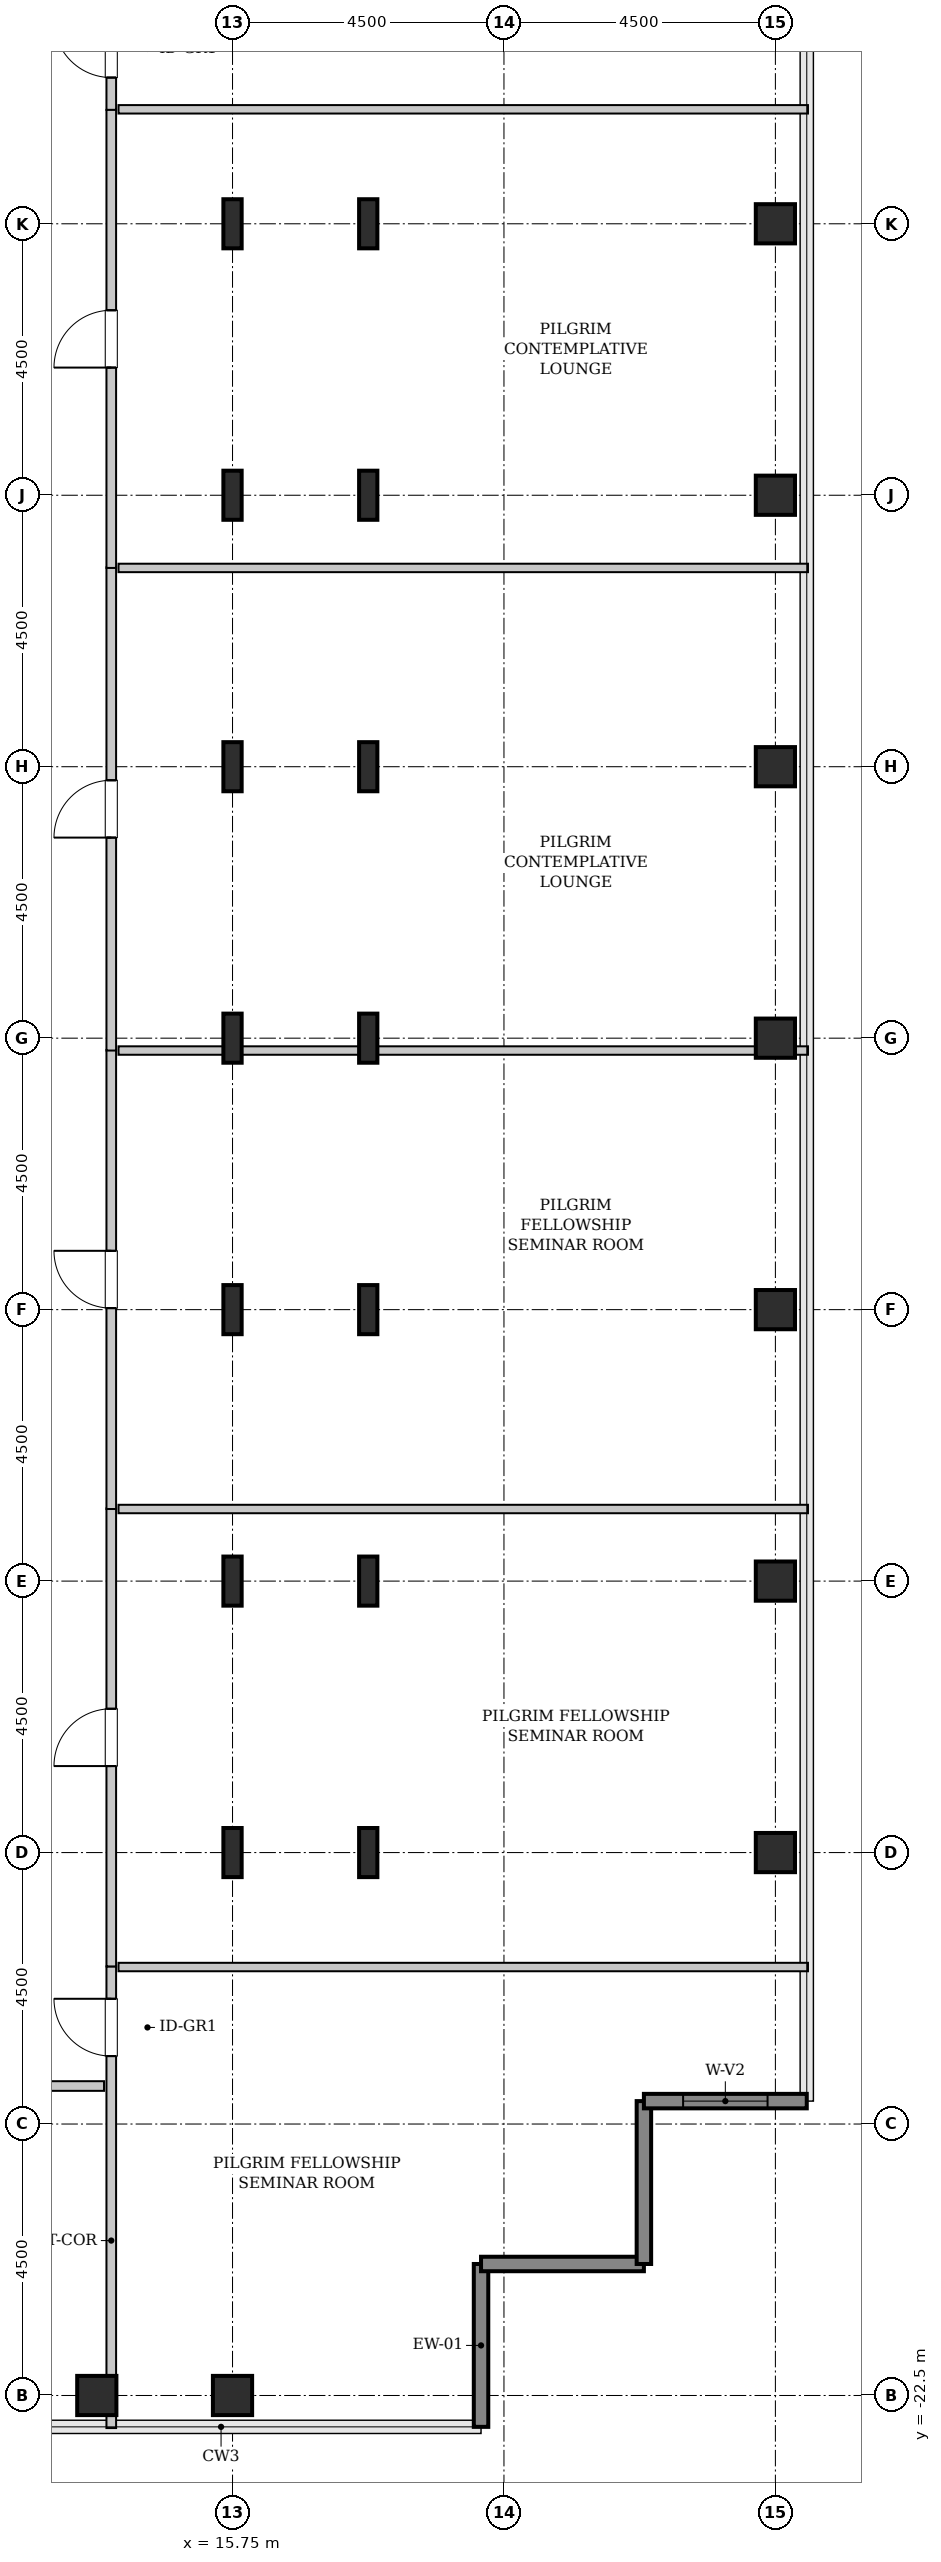
"""IFC4 building model, lengths in metres.
Left out: names, types, materials, properties, quantities, classifications, styles, units other than length and angle.
Written with IfcOpenShell. Run it as: python <this file> out.ifc"""

import sys

from ifc_helpers import new_model, si_unit, direction, frame, frame_2d, origin, origin_2d, place, context, subcontext, project, spatial, rectangle, hollow_rectangle, i_section, extrude, source, transform, mapped, element, fill, save


model = new_model("IFC4")
c1 = context("Model", 3, precision=1e-05, world=origin(), true_north=direction((0.0, 1.0)))
c2 = subcontext(c1, "Body", "Model", "MODEL_VIEW")
j1 = project(units=[si_unit("LENGTHUNIT", "METRE"), si_unit("PLANEANGLEUNIT", "RADIAN")], contexts=[c1])
p1 = place(None, origin())
s1 = spatial("IfcSite", under=j1, at=p1, CompositionType="ELEMENT")
p2 = place(p1, origin())
s2 = spatial("IfcBuilding", under=s1, at=p2, CompositionType="ELEMENT")
p3 = place(p2, frame((0.0, 0.0, 233.2)))
s3 = spatial("IfcBuildingStorey", under=s2, at=p3, CompositionType="ELEMENT", Elevation=233.2)
m1 = source(origin(), c2, "Body", "SweptSolid", [
    extrude(hollow_rectangle(XDim=0.65, YDim=0.65, WallThickness=0.032, InnerFilletRadius=0.032, OuterFilletRadius=0.064, at=origin_2d()), origin(), (0.0, 0.0, 1.0), 3.8),
])
for number, where, z_axis, x_axis in (
    (1, (13.5, -22.5, 0.0), (0.0, 0.0, 1.0), (1.0, 0.0, 0.0)),
    (2, (15.75, -22.5, 0.0), (0.0, 0.0, 1.0), (1.0, 0.0, 0.0)),
):
    element("IfcColumn", number, at=place(p3, frame(where, z_axis=z_axis, x_axis=x_axis)), inside=s3, PredefinedType="COLUMN", context=c2, shape_type="MappedRepresentation", body=[
        mapped(m1, transform((0.0, 0.0, 0.0), x_axis=(1.0, 0.0, 0.0), y_axis=(0.0, 1.0, 0.0), z_axis=(0.0, 0.0, 1.0), scale=1.0)),
    ])
m2 = source(origin(), c2, "Body", "SweptSolid", [
    extrude(i_section(OverallWidth=0.303, OverallDepth=0.814, WebThickness=0.021, FlangeThickness=0.04, FilletRadius=0.03, at=origin_2d()), origin(), (0.0, 0.0, 1.0), 3.8),
])
for number, where, z_axis, x_axis in (
    (3, (15.75, -13.5, 0.0), (0.0, 0.0, 1.0), (1.0, 0.0, 0.0)),
    (4, (15.75, -9.0, 0.0), (0.0, 0.0, 1.0), (1.0, 0.0, 0.0)),
    (5, (15.75, -4.5, 0.0), (0.0, 0.0, 1.0), (1.0, 0.0, 0.0)),
    (6, (15.75, 0.0, 0.0), (0.0, 0.0, 1.0), (1.0, 0.0, 0.0)),
    (7, (15.75, 4.5, 0.0), (0.0, 0.0, 1.0), (1.0, 0.0, 0.0)),
    (8, (15.75, 9.0, 0.0), (0.0, 0.0, 1.0), (1.0, 0.0, 0.0)),
    (9, (15.75, 13.5, 0.0), (0.0, 0.0, 1.0), (1.0, 0.0, 0.0)),
    (10, (18.0, -13.5, 0.0), (0.0, 0.0, 1.0), (1.0, 0.0, 0.0)),
    (11, (18.0, -9.0, 0.0), (0.0, 0.0, 1.0), (1.0, 0.0, 0.0)),
    (12, (18.0, -4.5, 0.0), (0.0, 0.0, 1.0), (1.0, 0.0, 0.0)),
    (13, (18.0, 0.0, 0.0), (0.0, 0.0, 1.0), (1.0, 0.0, 0.0)),
    (14, (18.0, 4.5, 0.0), (0.0, 0.0, 1.0), (1.0, 0.0, 0.0)),
    (15, (18.0, 9.0, 0.0), (0.0, 0.0, 1.0), (1.0, 0.0, 0.0)),
    (16, (18.0, 13.5, 0.0), (0.0, 0.0, 1.0), (1.0, 0.0, 0.0)),
):
    element("IfcColumn", number, at=place(p3, frame(where, z_axis=z_axis, x_axis=x_axis)), inside=s3, PredefinedType="COLUMN", context=c2, shape_type="MappedRepresentation", body=[
        mapped(m2, transform((0.0, 0.0, 0.0), x_axis=(1.0, 0.0, 0.0), y_axis=(0.0, 1.0, 0.0), z_axis=(0.0, 0.0, 1.0), scale=1.0)),
    ])
for number, where, z_axis, x_axis in (
    (17, (24.75, -13.5, 0.0), (0.0, 0.0, 1.0), (1.0, 0.0, 0.0)),
    (18, (24.75, -9.0, 0.0), (0.0, 0.0, 1.0), (1.0, 0.0, 0.0)),
    (19, (24.75, -4.5, 0.0), (0.0, 0.0, 1.0), (1.0, 0.0, 0.0)),
    (20, (24.75, 0.0, 0.0), (0.0, 0.0, 1.0), (1.0, 0.0, 0.0)),
    (21, (24.75, 4.5, 0.0), (0.0, 0.0, 1.0), (1.0, 0.0, 0.0)),
    (22, (24.75, 9.0, 0.0), (0.0, 0.0, 1.0), (1.0, 0.0, 0.0)),
    (23, (24.75, 13.5, 0.0), (0.0, 0.0, 1.0), (1.0, 0.0, 0.0)),
):
    element("IfcColumn", number, at=place(p3, frame(where, z_axis=z_axis, x_axis=x_axis)), inside=s3, PredefinedType="COLUMN", context=c2, shape_type="MappedRepresentation", body=[
        mapped(m1, transform((0.0, 0.0, 0.0), x_axis=(1.0, 0.0, 0.0), y_axis=(0.0, 1.0, 0.0), z_axis=(0.0, 0.0, 1.0), scale=1.0)),
    ])
m3 = source(origin(), c2, "Body", "SweptSolid", [
    extrude(rectangle(XDim=2.7, YDim=0.24, at=frame_2d((1.35, 0.0))), origin(), (0.0, 0.0, 1.0), 3.55),
])
for number, where, z_axis, x_axis in (
    (24, (19.87, -23.02, 0.0), (0.0, 0.0, 1.0), (0.0, 1.0, 0.0)),
    (25, (19.87, -20.32, 0.0), (0.0, 0.0, 1.0), (1.0, 0.0, 0.0)),
    (26, (22.57, -20.32, 0.0), (0.0, 0.0, 1.0), (0.0, 1.0, 0.0)),
):
    element("IfcWall", number, at=place(p3, frame(where, z_axis=z_axis, x_axis=x_axis)), inside=s3, PredefinedType="SHEAR", context=c2, shape_type="MappedRepresentation", body=[
        mapped(m3, transform((0.0, 0.0, 0.0), x_axis=(1.0, 0.0, 0.0), y_axis=(0.0, 1.0, 0.0), z_axis=(0.0, 0.0, 1.0), scale=1.0)),
    ])
p4 = place(p3, frame((22.57, -17.62, 0.0), z_axis=(0.0, 0.0, 1.0), x_axis=(1.0, 0.0, 0.0)))
e27 = element("IfcWall", 27, at=p4, inside=s3, PredefinedType="SHEAR", context=c2, shape_type="MappedRepresentation", body=[
    mapped(m3, transform((0.0, 0.0, 0.0), x_axis=(1.0, 0.0, 0.0), y_axis=(0.0, 1.0, 0.0), z_axis=(0.0, 0.0, 1.0), scale=1.0)),
])
p5 = place(p4, frame((0.65, 0.0, 0.85)))
e28 = element("IfcOpeningElement", 28, at=p5, cuts=e27, PredefinedType="OPENING", context=c2, shape_type="SweptSolid", body=[
    extrude(rectangle(XDim=1.4, YDim=1.8, at=frame_2d((0.7, 0.9))), frame((0.0, 0.13, 0.0), z_axis=(0.0, -1.0, 0.0), x_axis=(1.0, 0.0, 0.0)), (0.0, 0.0, 1.0), 0.26),
])
m4 = source(origin(), c2, "Body", "SweptSolid", [
    extrude(rectangle(XDim=7.653, YDim=0.16, at=frame_2d((3.826, 0.0))), origin(), (0.0, 0.0, 1.0), 3.535),
])
p6 = place(p3, frame((13.74, -23.04, 0.0), z_axis=(0.0, 0.0, 1.0), x_axis=(0.0, 1.0, 0.0)))
e29 = element("IfcWall", 29, at=p6, inside=s3, PredefinedType="PARTITIONING", context=c2, shape_type="MappedRepresentation", body=[
    mapped(m4, transform((0.0, 0.0, 0.0), x_axis=(1.0, 0.0, 0.0), y_axis=(0.0, 1.0, 0.0), z_axis=(0.0, 0.0, 1.0), scale=1.0)),
])
p7 = place(p6, frame((6.166, 0.0, 0.0)))
e30 = element("IfcOpeningElement", 30, at=p7, cuts=e29, PredefinedType="OPENING", context=c2, shape_type="SweptSolid", body=[
    extrude(rectangle(XDim=0.95, YDim=2.1, at=frame_2d((0.475, 1.05))), frame((0.0, 0.09, 0.0), z_axis=(0.0, -1.0, 0.0), x_axis=(1.0, 0.0, 0.0)), (0.0, 0.0, 1.0), 0.18),
])
m5 = source(origin(), c2, "Body", "SweptSolid", [
    extrude(rectangle(XDim=11.43, YDim=0.14, at=frame_2d((5.715, 0.0))), origin(), (0.0, 0.0, 1.0), 3.535),
])
p8 = place(p3, frame((13.86, -15.397, 0.0), z_axis=(0.0, 0.0, 1.0), x_axis=(1.0, 0.0, 0.0)))
e31 = element("IfcWall", 31, at=p8, inside=s3, PredefinedType="PARTITIONING", context=c2, shape_type="MappedRepresentation", body=[
    mapped(m5, transform((0.0, 0.0, 0.0), x_axis=(1.0, 0.0, 0.0), y_axis=(0.0, 1.0, 0.0), z_axis=(0.0, 0.0, 1.0), scale=1.0)),
])
m6 = source(origin(), c2, "Body", "SweptSolid", [
    extrude(rectangle(XDim=7.593, YDim=0.16, at=frame_2d((3.796, 0.0))), origin(), (0.0, 0.0, 1.0), 3.535),
])
p9 = place(p3, frame((13.74, -15.387, 0.0), z_axis=(0.0, 0.0, 1.0), x_axis=(0.0, 1.0, 0.0)))
e32 = element("IfcWall", 32, at=p9, inside=s3, PredefinedType="PARTITIONING", context=c2, shape_type="MappedRepresentation", body=[
    mapped(m6, transform((0.0, 0.0, 0.0), x_axis=(1.0, 0.0, 0.0), y_axis=(0.0, 1.0, 0.0), z_axis=(0.0, 0.0, 1.0), scale=1.0)),
])
p10 = place(p9, frame((3.321, 0.0, 0.0)))
e33 = element("IfcOpeningElement", 33, at=p10, cuts=e32, PredefinedType="OPENING", context=c2, shape_type="SweptSolid", body=[
    extrude(rectangle(XDim=0.95, YDim=2.1, at=frame_2d((0.475, 1.05))), frame((0.0, 0.09, 0.0), z_axis=(0.0, -1.0, 0.0), x_axis=(1.0, 0.0, 0.0)), (0.0, 0.0, 1.0), 0.18),
])
p11 = place(p3, frame((13.86, -7.805, 0.0), z_axis=(0.0, 0.0, 1.0), x_axis=(1.0, 0.0, 0.0)))
e34 = element("IfcWall", 34, at=p11, inside=s3, PredefinedType="PARTITIONING", context=c2, shape_type="MappedRepresentation", body=[
    mapped(m5, transform((0.0, 0.0, 0.0), x_axis=(1.0, 0.0, 0.0), y_axis=(0.0, 1.0, 0.0), z_axis=(0.0, 0.0, 1.0), scale=1.0)),
])
m7 = source(origin(), c2, "Body", "SweptSolid", [
    extrude(rectangle(XDim=7.61, YDim=0.16, at=frame_2d((3.805, 0.0))), origin(), (0.0, 0.0, 1.0), 3.535),
])
p12 = place(p3, frame((13.74, -7.805, 0.0), z_axis=(0.0, 0.0, 1.0), x_axis=(0.0, 1.0, 0.0)))
e35 = element("IfcWall", 35, at=p12, inside=s3, PredefinedType="PARTITIONING", context=c2, shape_type="MappedRepresentation", body=[
    mapped(m7, transform((0.0, 0.0, 0.0), x_axis=(1.0, 0.0, 0.0), y_axis=(0.0, 1.0, 0.0), z_axis=(0.0, 0.0, 1.0), scale=1.0)),
])
p13 = place(p12, frame((3.33, 0.0, 0.0)))
e36 = element("IfcOpeningElement", 36, at=p13, cuts=e35, PredefinedType="OPENING", context=c2, shape_type="SweptSolid", body=[
    extrude(rectangle(XDim=0.95, YDim=2.1, at=frame_2d((0.475, 1.05))), frame((0.0, 0.09, 0.0), z_axis=(0.0, -1.0, 0.0), x_axis=(1.0, 0.0, 0.0)), (0.0, 0.0, 1.0), 0.18),
])
m8 = source(origin(), c2, "Body", "SweptSolid", [
    extrude(rectangle(XDim=11.43, YDim=0.14, at=frame_2d((5.715, 0.0))), origin(), (0.0, 0.0, 1.0), 2.925),
])
p14 = place(p3, frame((13.86, -0.205, 0.0), z_axis=(0.0, 0.0, 1.0), x_axis=(1.0, 0.0, 0.0)))
e37 = element("IfcWall", 37, at=p14, inside=s3, PredefinedType="PARTITIONING", context=c2, shape_type="MappedRepresentation", body=[
    mapped(m8, transform((0.0, 0.0, 0.0), x_axis=(1.0, 0.0, 0.0), y_axis=(0.0, 1.0, 0.0), z_axis=(0.0, 0.0, 1.0), scale=1.0)),
])
m9 = source(origin(), c2, "Body", "SweptSolid", [
    extrude(rectangle(XDim=8.01, YDim=0.16, at=frame_2d((4.005, 0.0))), origin(), (0.0, 0.0, 1.0), 3.535),
])
p15 = place(p3, frame((13.74, -0.205, 0.0), z_axis=(0.0, 0.0, 1.0), x_axis=(0.0, 1.0, 0.0)))
e38 = element("IfcWall", 38, at=p15, inside=s3, PredefinedType="PARTITIONING", context=c2, shape_type="MappedRepresentation", body=[
    mapped(m9, transform((0.0, 0.0, 0.0), x_axis=(1.0, 0.0, 0.0), y_axis=(0.0, 1.0, 0.0), z_axis=(0.0, 0.0, 1.0), scale=1.0)),
])
p16 = place(p15, frame((3.53, 0.0, 0.0)))
e39 = element("IfcOpeningElement", 39, at=p16, cuts=e38, PredefinedType="OPENING", context=c2, shape_type="SweptSolid", body=[
    extrude(rectangle(XDim=0.95, YDim=2.1, at=frame_2d((0.475, 1.05))), frame((0.0, 0.09, 0.0), z_axis=(0.0, -1.0, 0.0), x_axis=(1.0, 0.0, 0.0)), (0.0, 0.0, 1.0), 0.18),
])
p17 = place(p3, frame((13.86, 7.795, 0.0), z_axis=(0.0, 0.0, 1.0), x_axis=(1.0, 0.0, 0.0)))
e40 = element("IfcWall", 40, at=p17, inside=s3, PredefinedType="PARTITIONING", context=c2, shape_type="MappedRepresentation", body=[
    mapped(m5, transform((0.0, 0.0, 0.0), x_axis=(1.0, 0.0, 0.0), y_axis=(0.0, 1.0, 0.0), z_axis=(0.0, 0.0, 1.0), scale=1.0)),
])
p18 = place(p3, frame((13.74, 15.387, 0.0), z_axis=(0.0, 0.0, 1.0), x_axis=(0.0, 1.0, 0.0)))
e41 = element("IfcWall", 41, at=p18, inside=s3, PredefinedType="PARTITIONING", context=c2, shape_type="MappedRepresentation", body=[
    mapped(m4, transform((0.0, 0.0, 0.0), x_axis=(1.0, 0.0, 0.0), y_axis=(0.0, 1.0, 0.0), z_axis=(0.0, 0.0, 1.0), scale=1.0)),
])
p19 = place(p18, frame((0.536, 0.0, 0.0)))
e42 = element("IfcOpeningElement", 42, at=p19, cuts=e41, PredefinedType="OPENING", context=c2, shape_type="SweptSolid", body=[
    extrude(rectangle(XDim=0.95, YDim=2.1, at=frame_2d((0.475, 1.05))), frame((0.0, 0.09, 0.0), z_axis=(0.0, -1.0, 0.0), x_axis=(1.0, 0.0, 0.0)), (0.0, 0.0, 1.0), 0.18),
])
p20 = place(p3, frame((13.86, 15.397, 0.0), z_axis=(0.0, 0.0, 1.0), x_axis=(1.0, 0.0, 0.0)))
e43 = element("IfcWall", 43, at=p20, inside=s3, PredefinedType="PARTITIONING", context=c2, shape_type="MappedRepresentation", body=[
    mapped(m5, transform((0.0, 0.0, 0.0), x_axis=(1.0, 0.0, 0.0), y_axis=(0.0, 1.0, 0.0), z_axis=(0.0, 0.0, 1.0), scale=1.0)),
])
p21 = place(p3, frame((13.74, 7.795, 0.0), z_axis=(0.0, 0.0, 1.0), x_axis=(0.0, 1.0, 0.0)))
e44 = element("IfcWall", 44, at=p21, inside=s3, PredefinedType="PARTITIONING", context=c2, shape_type="MappedRepresentation", body=[
    mapped(m6, transform((0.0, 0.0, 0.0), x_axis=(1.0, 0.0, 0.0), y_axis=(0.0, 1.0, 0.0), z_axis=(0.0, 0.0, 1.0), scale=1.0)),
])
p22 = place(p21, frame((3.321, 0.0, 0.0)))
e45 = element("IfcOpeningElement", 45, at=p22, cuts=e44, PredefinedType="OPENING", context=c2, shape_type="SweptSolid", body=[
    extrude(rectangle(XDim=0.95, YDim=2.1, at=frame_2d((0.475, 1.05))), frame((0.0, 0.09, 0.0), z_axis=(0.0, -1.0, 0.0), x_axis=(1.0, 0.0, 0.0)), (0.0, 0.0, 1.0), 0.18),
])
m10 = source(origin(), c2, "Body", "SweptSolid", [
    extrude(rectangle(XDim=5.225, YDim=0.16, at=frame_2d((2.613, 0.0))), origin(), (0.0, 0.0, 1.0), 3.535),
])
p23 = place(p3, frame((8.395, -17.37, 0.0), z_axis=(0.0, 0.0, 1.0), x_axis=(1.0, 0.0, 0.0)))
e46 = element("IfcWall", 46, at=p23, inside=s3, PredefinedType="PARTITIONING", context=c2, shape_type="MappedRepresentation", body=[
    mapped(m10, transform((0.0, 0.0, 0.0), x_axis=(1.0, 0.0, 0.0), y_axis=(0.0, 1.0, 0.0), z_axis=(0.0, 0.0, 1.0), scale=1.0)),
])
p24 = place(p23, frame((1.543, 0.0, 0.0)))
e47 = element("IfcOpeningElement", 47, at=p24, cuts=e46, PredefinedType="OPENING", context=c2, shape_type="SweptSolid", body=[
    extrude(rectangle(XDim=0.95, YDim=2.1, at=frame_2d((0.475, 1.05))), frame((0.0, 0.09, 0.0), z_axis=(0.0, -1.0, 0.0), x_axis=(1.0, 0.0, 0.0)), (0.0, 0.0, 1.0), 0.18),
])
m11 = source(origin(), c2, "Body", "SweptSolid", [
    extrude(rectangle(XDim=1.4, YDim=1.8, at=frame_2d((0.7, 0.9))), frame((0.0, 0.03, 0.0), z_axis=(0.0, -1.0, 0.0), x_axis=(1.0, 0.0, 0.0)), (0.0, 0.0, 1.0), 0.06),
])
p25 = place(p5, origin())
e48 = element("IfcWindow", 48, at=p25, inside=s3, PartitioningType="SINGLE_PANEL", PredefinedType="WINDOW", context=c2, shape_type="MappedRepresentation", body=[
    mapped(m11, transform((0.0, 0.0, 0.0), x_axis=(1.0, 0.0, 0.0), y_axis=(0.0, 1.0, 0.0), z_axis=(0.0, 0.0, 1.0), scale=1.0)),
])
fill(e28, e48)
m12 = source(origin(), c2, "Body", "SweptSolid", [
    extrude(rectangle(XDim=0.95, YDim=2.1, at=frame_2d((0.475, 1.05))), frame((0.0, 0.025, 0.0), z_axis=(0.0, -1.0, 0.0), x_axis=(1.0, 0.0, 0.0)), (0.0, 0.0, 1.0), 0.05),
])
p26 = place(p7, origin())
e49 = element("IfcDoor", 49, at=p26, inside=s3, OperationType="SINGLE_SWING_RIGHT", PredefinedType="DOOR", context=c2, shape_type="MappedRepresentation", body=[
    mapped(m12, transform((0.0, 0.0, 0.0), x_axis=(1.0, 0.0, 0.0), y_axis=(0.0, 1.0, 0.0), z_axis=(0.0, 0.0, 1.0), scale=1.0)),
])
fill(e30, e49)
p27 = place(p10, origin())
e50 = element("IfcDoor", 50, at=p27, inside=s3, OperationType="SINGLE_SWING_LEFT", PredefinedType="DOOR", context=c2, shape_type="MappedRepresentation", body=[
    mapped(m12, transform((0.0, 0.0, 0.0), x_axis=(1.0, 0.0, 0.0), y_axis=(0.0, 1.0, 0.0), z_axis=(0.0, 0.0, 1.0), scale=1.0)),
])
fill(e33, e50)
p28 = place(p13, origin())
e51 = element("IfcDoor", 51, at=p28, inside=s3, OperationType="SINGLE_SWING_RIGHT", PredefinedType="DOOR", context=c2, shape_type="MappedRepresentation", body=[
    mapped(m12, transform((0.0, 0.0, 0.0), x_axis=(1.0, 0.0, 0.0), y_axis=(0.0, 1.0, 0.0), z_axis=(0.0, 0.0, 1.0), scale=1.0)),
])
fill(e36, e51)
p29 = place(p16, origin())
e52 = element("IfcDoor", 52, at=p29, inside=s3, OperationType="SINGLE_SWING_LEFT", PredefinedType="DOOR", context=c2, shape_type="MappedRepresentation", body=[
    mapped(m12, transform((0.0, 0.0, 0.0), x_axis=(1.0, 0.0, 0.0), y_axis=(0.0, 1.0, 0.0), z_axis=(0.0, 0.0, 1.0), scale=1.0)),
])
fill(e39, e52)
p30 = place(p19, origin())
e53 = element("IfcDoor", 53, at=p30, inside=s3, OperationType="SINGLE_SWING_RIGHT", PredefinedType="DOOR", context=c2, shape_type="MappedRepresentation", body=[
    mapped(m12, transform((0.0, 0.0, 0.0), x_axis=(1.0, 0.0, 0.0), y_axis=(0.0, 1.0, 0.0), z_axis=(0.0, 0.0, 1.0), scale=1.0)),
])
fill(e42, e53)
p31 = place(p22, origin())
e54 = element("IfcDoor", 54, at=p31, inside=s3, OperationType="SINGLE_SWING_LEFT", PredefinedType="DOOR", context=c2, shape_type="MappedRepresentation", body=[
    mapped(m12, transform((0.0, 0.0, 0.0), x_axis=(1.0, 0.0, 0.0), y_axis=(0.0, 1.0, 0.0), z_axis=(0.0, 0.0, 1.0), scale=1.0)),
])
fill(e45, e54)
save(model, sys.argv[1])
